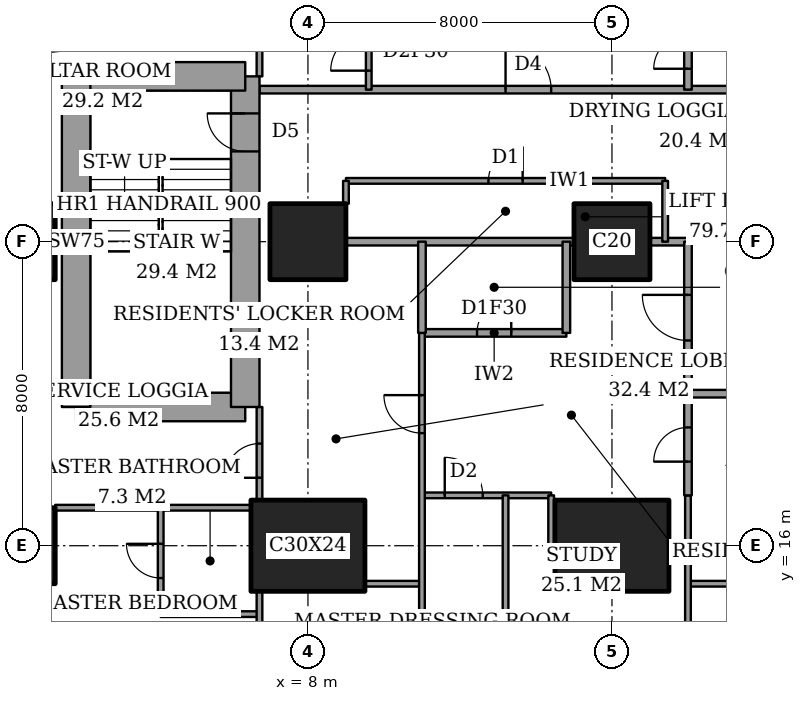
"""IFC4 building model, lengths in metres.
Left out: names, types, materials, properties, quantities, classifications, styles, units other than length and angle.
Written with IfcOpenShell. Run it as: python <this file> out.ifc"""

import sys

from ifc_helpers import new_model, si_unit, direction, frame, frame_2d, origin, origin_2d, place, context, subcontext, project, spatial, rectangle, extrude, element, fill, save


model = new_model("IFC4")
c1 = context("Model", 3, precision=1e-05, world=origin(), true_north=direction((0.0, 1.0)))
c2 = subcontext(c1, "Body", "Model", "MODEL_VIEW")
j1 = project(units=[si_unit("LENGTHUNIT", "METRE"), si_unit("PLANEANGLEUNIT", "RADIAN")], contexts=[c1])
p1 = place(None, origin())
s1 = spatial("IfcSite", under=j1, at=p1, CompositionType="ELEMENT")
p2 = place(p1, origin())
s2 = spatial("IfcBuilding", under=s1, at=p2, CompositionType="ELEMENT")
p3 = place(p2, frame((0.0, 0.0, 72.8)))
s3 = spatial("IfcBuildingStorey", under=s2, at=p3, CompositionType="ELEMENT", Elevation=72.8)
for number, where, z_axis, x_axis in (
    (1, (0.35, 16.0, 0.0), (0.0, 0.0, 1.0), (1.0, 0.0, 0.0)),
    (2, (0.35, 24.0, 0.0), (0.0, 0.0, 1.0), (1.0, 0.0, 0.0)),
):
    element("IfcColumn", number, at=place(p3, frame(where, z_axis=z_axis, x_axis=x_axis)), inside=s3, PredefinedType="COLUMN", context=c2, shape_type="SweptSolid", body=[
        extrude(rectangle(XDim=2.0, YDim=2.0, at=origin_2d()), origin(), (0.0, 0.0, 1.0), 3.6),
    ])
p4 = place(p3, frame((8.0, 16.0, 0.0), z_axis=(0.0, 0.0, 1.0), x_axis=(1.0, 0.0, 0.0)))
e3 = element("IfcColumn", 3, at=p4, inside=s3, PredefinedType="COLUMN", context=c2, shape_type="SweptSolid", body=[
    extrude(rectangle(XDim=3.0, YDim=2.4, at=origin_2d()), origin(), (0.0, 0.0, 1.0), 3.6),
])
p5 = place(p3, frame((8.0, 24.0, 0.0), z_axis=(0.0, 0.0, 1.0), x_axis=(1.0, 0.0, 0.0)))
e4 = element("IfcColumn", 4, at=p5, inside=s3, PredefinedType="COLUMN", context=c2, shape_type="SweptSolid", body=[
    extrude(rectangle(XDim=2.0, YDim=2.0, at=origin_2d()), origin(), (0.0, 0.0, 1.0), 3.6),
])
p6 = place(p3, frame((16.0, 16.0, 0.0), z_axis=(0.0, 0.0, 1.0), x_axis=(1.0, 0.0, 0.0)))
e5 = element("IfcColumn", 5, at=p6, inside=s3, PredefinedType="COLUMN", context=c2, shape_type="SweptSolid", body=[
    extrude(rectangle(XDim=3.0, YDim=2.4, at=origin_2d()), origin(), (0.0, 0.0, 1.0), 3.6),
])
p7 = place(p3, frame((16.0, 24.0, 0.0), z_axis=(0.0, 0.0, 1.0), x_axis=(1.0, 0.0, 0.0)))
e6 = element("IfcColumn", 6, at=p7, inside=s3, PredefinedType="COLUMN", context=c2, shape_type="SweptSolid", body=[
    extrude(rectangle(XDim=2.0, YDim=2.0, at=origin_2d()), origin(), (0.0, 0.0, 1.0), 3.6),
])
p8 = place(p3, frame((1.9, 19.65, 0.0), z_axis=(0.0, 0.0, 1.0), x_axis=(1.0, 0.0, 0.0)))
e7 = element("IfcWall", 7, at=p8, inside=s3, PredefinedType="SHEAR", context=c2, shape_type="SweptSolid", body=[
    extrude(rectangle(XDim=4.45, YDim=0.75, at=frame_2d((2.225, 0.0))), origin(), (0.0, 0.0, 1.0), 3.6),
])
p9 = place(p3, frame((6.35, 19.65, 0.0), z_axis=(0.0, 0.0, 1.0), x_axis=(0.0, 1.0, 0.0)))
e8 = element("IfcWall", 8, at=p9, inside=s3, PredefinedType="SHEAR", context=c2, shape_type="SweptSolid", body=[
    extrude(rectangle(XDim=8.7, YDim=0.75, at=frame_2d((4.35, 0.0))), origin(), (0.0, 0.0, 1.0), 3.6),
])
p10 = place(p9, frame((6.725, 0.0, 0.0)))
e9 = element("IfcOpeningElement", 9, at=p10, cuts=e8, PredefinedType="OPENING", context=c2, shape_type="SweptSolid", body=[
    extrude(rectangle(XDim=1.0, YDim=2.1, at=frame_2d((0.5, 1.05))), frame((0.0, 0.385, 0.0), z_axis=(0.0, -1.0, 0.0), x_axis=(1.0, 0.0, 0.0)), (0.0, 0.0, 1.0), 0.77),
])
p11 = place(p3, frame((6.35, 28.35, 0.0), z_axis=(0.0, 0.0, 1.0), x_axis=(-1.0, 0.0, 0.0)))
e10 = element("IfcWall", 10, at=p11, inside=s3, PredefinedType="SHEAR", context=c2, shape_type="SweptSolid", body=[
    extrude(rectangle(XDim=4.45, YDim=0.75, at=frame_2d((2.225, 0.0))), origin(), (0.0, 0.0, 1.0), 3.6),
])
p12 = place(p3, frame((1.9, 28.35, 0.0), z_axis=(0.0, 0.0, 1.0), x_axis=(0.0, -1.0, 0.0)))
e11 = element("IfcWall", 11, at=p12, inside=s3, PredefinedType="SHEAR", context=c2, shape_type="SweptSolid", body=[
    extrude(rectangle(XDim=8.7, YDim=0.75, at=frame_2d((4.35, 0.0))), origin(), (0.0, 0.0, 1.0), 3.6),
])
p13 = place(p3, frame((4.125, 14.2, 0.0), z_axis=(0.0, 0.0, 1.0), x_axis=(1.0, 0.0, 0.0)))
e12 = element("IfcWall", 12, at=p13, inside=s3, PredefinedType="PARTITIONING", context=c2, shape_type="SweptSolid", body=[
    extrude(rectangle(XDim=2.6, YDim=0.15, at=frame_2d((1.3, 0.0))), origin(), (0.0, 0.0, 1.0), 3.35),
])
p14 = place(p3, frame((9.5, 15.0, 0.0), z_axis=(0.0, 0.0, 1.0), x_axis=(1.0, 0.0, 0.0)))
e13 = element("IfcWall", 13, at=p14, inside=s3, PredefinedType="PARTITIONING", context=c2, shape_type="SweptSolid", body=[
    extrude(rectangle(XDim=1.5, YDim=0.15, at=frame_2d((0.75, 0.0))), origin(), (0.0, 0.0, 1.0), 3.35),
])
p15 = place(p3, frame((18.0, 15.0, 0.0), z_axis=(0.0, 0.0, 1.0), x_axis=(1.0, 0.0, 0.0)))
e14 = element("IfcWall", 14, at=p15, inside=s3, PredefinedType="PARTITIONING", context=c2, shape_type="SweptSolid", body=[
    extrude(rectangle(XDim=6.0, YDim=0.15, at=frame_2d((3.0, 0.0))), origin(), (0.0, 0.0, 1.0), 3.35),
])
p16 = place(p3, frame((17.5, 15.875, 0.0), z_axis=(0.0, 0.0, 1.0), x_axis=(1.0, 0.0, 0.0)))
e15 = element("IfcWall", 15, at=p16, inside=s3, PredefinedType="PARTITIONING", context=c2, shape_type="SweptSolid", body=[
    extrude(rectangle(XDim=0.5, YDim=0.15, at=frame_2d((0.25, 0.0))), origin(), (0.0, 0.0, 1.0), 2.634),
])
p17 = place(p3, frame((1.35, 17.0, 0.0), z_axis=(0.0, 0.0, 1.0), x_axis=(1.0, 0.0, 0.0)))
e16 = element("IfcWall", 16, at=p17, inside=s3, PredefinedType="PARTITIONING", context=c2, shape_type="SweptSolid", body=[
    extrude(rectangle(XDim=5.15, YDim=0.15, at=frame_2d((2.575, 0.0))), origin(), (0.0, 0.0, 1.0), 3.35),
])
p18 = place(p3, frame((11.0, 17.325, 0.0), z_axis=(0.0, 0.0, 1.0), x_axis=(1.0, 0.0, 0.0)))
e17 = element("IfcWall", 17, at=p18, inside=s3, PredefinedType="PARTITIONING", context=c2, shape_type="SweptSolid", body=[
    extrude(rectangle(XDim=3.4, YDim=0.15, at=frame_2d((1.7, 0.0))), origin(), (0.0, 0.0, 1.0), 3.35),
])
p19 = place(p18, frame((0.6, 0.0, 0.0)))
e18 = element("IfcOpeningElement", 18, at=p19, cuts=e17, PredefinedType="OPENING", context=c2, shape_type="SweptSolid", body=[
    extrude(rectangle(XDim=1.0, YDim=2.1, at=frame_2d((0.5, 1.05))), frame((0.0, 0.085, 0.0), z_axis=(0.0, -1.0, 0.0), x_axis=(1.0, 0.0, 0.0)), (0.0, 0.0, 1.0), 0.17),
])
p20 = place(p3, frame((18.0, 20.0, 0.0), z_axis=(0.0, 0.0, 1.0), x_axis=(1.0, 0.0, 0.0)))
e19 = element("IfcWall", 19, at=p20, inside=s3, PredefinedType="PARTITIONING", context=c2, shape_type="SweptSolid", body=[
    extrude(rectangle(XDim=6.0, YDim=0.2, at=frame_2d((3.0, 0.0))), origin(), (0.0, 0.0, 1.0), 3.35),
])
p21 = place(p3, frame((11.0, 21.6, 0.0), z_axis=(0.0, 0.0, 1.0), x_axis=(1.0, 0.0, 0.0)))
e20 = element("IfcWall", 20, at=p21, inside=s3, PredefinedType="PARTITIONING", context=c2, shape_type="SweptSolid", body=[
    extrude(rectangle(XDim=3.8, YDim=0.2, at=frame_2d((1.9, 0.0))), origin(), (0.0, 0.0, 1.0), 3.35),
])
p22 = place(p21, frame((1.45, 0.0, 0.0)))
e21 = element("IfcOpeningElement", 21, at=p22, cuts=e20, PredefinedType="OPENING", context=c2, shape_type="SweptSolid", body=[
    extrude(rectangle(XDim=0.9, YDim=2.1, at=frame_2d((0.45, 1.05))), frame((0.0, 0.11, 0.0), z_axis=(0.0, -1.0, 0.0), x_axis=(1.0, 0.0, 0.0)), (0.0, 0.0, 1.0), 0.22),
])
p23 = place(p3, frame((9.0, 24.0, 0.0), z_axis=(0.0, 0.0, 1.0), x_axis=(1.0, 0.0, 0.0)))
e22 = element("IfcWall", 22, at=p23, inside=s3, PredefinedType="PARTITIONING", context=c2, shape_type="SweptSolid", body=[
    extrude(rectangle(XDim=6.0, YDim=0.2, at=frame_2d((3.0, 0.0))), origin(), (0.0, 0.0, 1.0), 3.35),
])
p24 = place(p3, frame((17.0, 24.0, 0.0), z_axis=(0.0, 0.0, 1.0), x_axis=(1.0, 0.0, 0.0)))
e23 = element("IfcWall", 23, at=p24, inside=s3, PredefinedType="PARTITIONING", context=c2, shape_type="SweptSolid", body=[
    extrude(rectangle(XDim=1.0, YDim=0.2, at=frame_2d((0.5, 0.0))), origin(), (0.0, 0.0, 1.0), 3.35),
])
p25 = place(p3, frame((9.0, 25.6, 0.0), z_axis=(0.0, 0.0, 1.0), x_axis=(1.0, 0.0, 0.0)))
e24 = element("IfcWall", 24, at=p25, inside=s3, PredefinedType="PARTITIONING", context=c2, shape_type="SweptSolid", body=[
    extrude(rectangle(XDim=8.4, YDim=0.15, at=frame_2d((4.2, 0.0))), origin(), (0.0, 0.0, 1.0), 3.35),
])
p26 = place(p25, frame((3.75, 0.0, 0.0)))
e25 = element("IfcOpeningElement", 25, at=p26, cuts=e24, PredefinedType="OPENING", context=c2, shape_type="SweptSolid", body=[
    extrude(rectangle(XDim=0.9, YDim=2.1, at=frame_2d((0.45, 1.05))), frame((0.0, 0.085, 0.0), z_axis=(0.0, -1.0, 0.0), x_axis=(1.0, 0.0, 0.0)), (0.0, 0.0, 1.0), 0.17),
])
p27 = place(p3, frame((6.725, 28.0, 0.0), z_axis=(0.0, 0.0, 1.0), x_axis=(1.0, 0.0, 0.0)))
e26 = element("IfcWall", 26, at=p27, inside=s3, PredefinedType="PARTITIONING", context=c2, shape_type="SweptSolid", body=[
    extrude(rectangle(XDim=17.275, YDim=0.2, at=frame_2d((8.637, 0.0))), origin(), (0.0, 0.0, 1.0), 3.35),
])
p28 = place(p27, frame((6.475, 0.0, 0.0)))
e27 = element("IfcOpeningElement", 27, at=p28, cuts=e26, PredefinedType="OPENING", context=c2, shape_type="SweptSolid", body=[
    extrude(rectangle(XDim=1.2, YDim=2.4, at=frame_2d((0.6, 1.2))), frame((0.0, 0.11, 0.0), z_axis=(0.0, -1.0, 0.0), x_axis=(1.0, 0.0, 0.0)), (0.0, 0.0, 1.0), 0.22),
])
p29 = place(p3, frame((4.125, 14.2, 0.0), z_axis=(0.0, 0.0, 1.0), x_axis=(0.0, 1.0, 0.0)))
e28 = element("IfcWall", 28, at=p29, inside=s3, PredefinedType="PARTITIONING", context=c2, shape_type="SweptSolid", body=[
    extrude(rectangle(XDim=2.8, YDim=0.15, at=frame_2d((1.4, 0.0))), origin(), (0.0, 0.0, 1.0), 3.35),
])
p30 = place(p29, frame((0.95, 0.0, 0.0)))
e29 = element("IfcOpeningElement", 29, at=p30, cuts=e28, PredefinedType="OPENING", context=c2, shape_type="SweptSolid", body=[
    extrude(rectangle(XDim=0.9, YDim=2.1, at=frame_2d((0.45, 1.05))), frame((0.0, 0.085, 0.0), z_axis=(0.0, -1.0, 0.0), x_axis=(1.0, 0.0, 0.0)), (0.0, 0.0, 1.0), 0.17),
])
p31 = place(p3, frame((6.725, 11.0, 0.0), z_axis=(0.0, 0.0, 1.0), x_axis=(0.0, 1.0, 0.0)))
e30 = element("IfcWall", 30, at=p31, inside=s3, PredefinedType="PARTITIONING", context=c2, shape_type="SweptSolid", body=[
    extrude(rectangle(XDim=3.8, YDim=0.15, at=frame_2d((1.9, 0.0))), origin(), (0.0, 0.0, 1.0), 3.35),
])
p32 = place(p31, frame((1.15, 0.0, 0.0)))
e31 = element("IfcOpeningElement", 31, at=p32, cuts=e30, PredefinedType="OPENING", context=c2, shape_type="SweptSolid", body=[
    extrude(rectangle(XDim=0.9, YDim=2.1, at=frame_2d((0.45, 1.05))), frame((0.0, 0.085, 0.0), z_axis=(0.0, -1.0, 0.0), x_axis=(1.0, 0.0, 0.0)), (0.0, 0.0, 1.0), 0.17),
])
p33 = place(p3, frame((6.725, 17.2, 0.0), z_axis=(0.0, 0.0, 1.0), x_axis=(0.0, 1.0, 0.0)))
e32 = element("IfcWall", 32, at=p33, inside=s3, PredefinedType="PARTITIONING", context=c2, shape_type="SweptSolid", body=[
    extrude(rectangle(XDim=2.45, YDim=0.15, at=frame_2d((1.225, 0.0))), origin(), (0.0, 0.0, 1.0), 3.35),
])
p34 = place(p33, frame((0.587, 0.0, 0.0)))
e33 = element("IfcOpeningElement", 33, at=p34, cuts=e32, PredefinedType="OPENING", context=c2, shape_type="SweptSolid", body=[
    extrude(rectangle(XDim=0.9, YDim=2.1, at=frame_2d((0.45, 1.05))), frame((0.0, 0.085, 0.0), z_axis=(0.0, -1.0, 0.0), x_axis=(1.0, 0.0, 0.0)), (0.0, 0.0, 1.0), 0.17),
])
p35 = place(p3, frame((6.725, 28.35, 0.0), z_axis=(0.0, 0.0, 1.0), x_axis=(0.0, 1.0, 0.0)))
e34 = element("IfcWall", 34, at=p35, inside=s3, PredefinedType="PARTITIONING", context=c2, shape_type="SweptSolid", body=[
    extrude(rectangle(XDim=2.45, YDim=0.15, at=frame_2d((1.225, 0.0))), origin(), (0.0, 0.0, 1.0), 3.35),
])
p36 = place(p35, frame((0.913, 0.0, 0.0)))
e35 = element("IfcOpeningElement", 35, at=p36, cuts=e34, PredefinedType="OPENING", context=c2, shape_type="SweptSolid", body=[
    extrude(rectangle(XDim=1.0, YDim=2.1, at=frame_2d((0.5, 1.05))), frame((0.0, 0.085, 0.0), z_axis=(0.0, -1.0, 0.0), x_axis=(1.0, 0.0, 0.0)), (0.0, 0.0, 1.0), 0.17),
])
p37 = place(p3, frame((9.0, 25.0, 0.0), z_axis=(0.0, 0.0, 1.0), x_axis=(0.0, 1.0, 0.0)))
e36 = element("IfcWall", 36, at=p37, inside=s3, PredefinedType="PARTITIONING", context=c2, shape_type="SweptSolid", body=[
    extrude(rectangle(XDim=0.6, YDim=0.15, at=frame_2d((0.3, 0.0))), origin(), (0.0, 0.0, 1.0), 3.35),
])
p38 = place(p3, frame((9.6, 28.0, 0.0), z_axis=(0.0, 0.0, 1.0), x_axis=(0.0, 1.0, 0.0)))
e37 = element("IfcWall", 37, at=p38, inside=s3, PredefinedType="PARTITIONING", context=c2, shape_type="SweptSolid", body=[
    extrude(rectangle(XDim=9.4, YDim=0.15, at=frame_2d((4.7, 0.0))), origin(), (0.0, 0.0, 1.0), 3.35),
])
p39 = place(p38, frame((0.5, 0.0, 0.0)))
e38 = element("IfcOpeningElement", 38, at=p39, cuts=e37, PredefinedType="OPENING", context=c2, shape_type="SweptSolid", body=[
    extrude(rectangle(XDim=1.0, YDim=2.1, at=frame_2d((0.5, 1.05))), frame((0.0, 0.085, 0.0), z_axis=(0.0, -1.0, 0.0), x_axis=(1.0, 0.0, 0.0)), (0.0, 0.0, 1.0), 0.17),
])
p40 = place(p3, frame((11.0, 21.6, 0.0), z_axis=(0.0, 0.0, 1.0), x_axis=(0.0, 1.0, 0.0)))
e39 = element("IfcWall", 39, at=p40, inside=s3, PredefinedType="PARTITIONING", context=c2, shape_type="SweptSolid", body=[
    extrude(rectangle(XDim=2.4, YDim=0.2, at=frame_2d((1.2, 0.0))), origin(), (0.0, 0.0, 1.0), 3.35),
])
p41 = place(p3, frame((11.0, 11.0, 0.0), z_axis=(0.0, 0.0, 1.0), x_axis=(0.0, 1.0, 0.0)))
e40 = element("IfcWall", 40, at=p41, inside=s3, PredefinedType="PARTITIONING", context=c2, shape_type="SweptSolid", body=[
    extrude(rectangle(XDim=10.6, YDim=0.15, at=frame_2d((5.3, 0.0))), origin(), (0.0, 0.0, 1.0), 3.35),
])
p42 = place(p41, frame((7.962, 0.0, 0.0)))
e41 = element("IfcOpeningElement", 41, at=p42, cuts=e40, PredefinedType="OPENING", context=c2, shape_type="SweptSolid", body=[
    extrude(rectangle(XDim=1.0, YDim=2.1, at=frame_2d((0.5, 1.05))), frame((0.0, 0.085, 0.0), z_axis=(0.0, -1.0, 0.0), x_axis=(1.0, 0.0, 0.0)), (0.0, 0.0, 1.0), 0.17),
])
p43 = place(p3, frame((13.2, 11.0, 0.0), z_axis=(0.0, 0.0, 1.0), x_axis=(0.0, 1.0, 0.0)))
e42 = element("IfcWall", 42, at=p43, inside=s3, PredefinedType="PARTITIONING", context=c2, shape_type="SweptSolid", body=[
    extrude(rectangle(XDim=6.325, YDim=0.15, at=frame_2d((3.163, 0.0))), origin(), (0.0, 0.0, 1.0), 3.35),
])
p44 = place(p3, frame((14.4, 15.875, 0.0), z_axis=(0.0, 0.0, 1.0), x_axis=(0.0, 1.0, 0.0)))
e43 = element("IfcWall", 43, at=p44, inside=s3, PredefinedType="PARTITIONING", context=c2, shape_type="SweptSolid", body=[
    extrude(rectangle(XDim=1.45, YDim=0.15, at=frame_2d((0.725, 0.0))), origin(), (0.0, 0.0, 1.0), 3.35),
])
p45 = place(p3, frame((14.8, 21.6, 0.0), z_axis=(0.0, 0.0, 1.0), x_axis=(0.0, 1.0, 0.0)))
e44 = element("IfcWall", 44, at=p45, inside=s3, PredefinedType="PARTITIONING", context=c2, shape_type="SweptSolid", body=[
    extrude(rectangle(XDim=2.4, YDim=0.2, at=frame_2d((1.2, 0.0))), origin(), (0.0, 0.0, 1.0), 3.35),
])
p46 = place(p3, frame((17.4, 24.0, 0.0), z_axis=(0.0, 0.0, 1.0), x_axis=(0.0, 1.0, 0.0)))
e45 = element("IfcWall", 45, at=p46, inside=s3, PredefinedType="PARTITIONING", context=c2, shape_type="SweptSolid", body=[
    extrude(rectangle(XDim=1.6, YDim=0.15, at=frame_2d((0.8, 0.0))), origin(), (0.0, 0.0, 1.0), 3.35),
])
p47 = place(p3, frame((18.0, 17.325, 0.0), z_axis=(0.0, 0.0, 1.0), x_axis=(0.0, 1.0, 0.0)))
e46 = element("IfcWall", 46, at=p47, inside=s3, PredefinedType="PARTITIONING", context=c2, shape_type="SweptSolid", body=[
    extrude(rectangle(XDim=6.675, YDim=0.2, at=frame_2d((3.337, 0.0))), origin(), (0.0, 0.0, 1.0), 3.35),
])
p48 = place(p47, frame((4.075, 0.0, 0.0)))
e47 = element("IfcOpeningElement", 47, at=p48, cuts=e46, PredefinedType="OPENING", context=c2, shape_type="SweptSolid", body=[
    extrude(rectangle(XDim=1.2, YDim=2.4, at=frame_2d((0.6, 1.2))), frame((0.0, 0.11, 0.0), z_axis=(0.0, -1.0, 0.0), x_axis=(1.0, 0.0, 0.0)), (0.0, 0.0, 1.0), 0.22),
])
p49 = place(p47, frame((0.887, 0.0, 0.0)))
e48 = element("IfcOpeningElement", 48, at=p49, cuts=e46, PredefinedType="OPENING", context=c2, shape_type="SweptSolid", body=[
    extrude(rectangle(XDim=0.9, YDim=2.1, at=frame_2d((0.45, 1.05))), frame((0.0, 0.11, 0.0), z_axis=(0.0, -1.0, 0.0), x_axis=(1.0, 0.0, 0.0)), (0.0, 0.0, 1.0), 0.22),
])
p50 = place(p3, frame((18.0, 28.0, 0.0), z_axis=(0.0, 0.0, 1.0), x_axis=(0.0, 1.0, 0.0)))
e49 = element("IfcWall", 49, at=p50, inside=s3, PredefinedType="PARTITIONING", context=c2, shape_type="SweptSolid", body=[
    extrude(rectangle(XDim=3.4, YDim=0.2, at=frame_2d((1.7, 0.0))), origin(), (0.0, 0.0, 1.0), 3.35),
])
p51 = place(p50, frame((0.55, 0.0, 0.0)))
e50 = element("IfcOpeningElement", 50, at=p51, cuts=e49, PredefinedType="OPENING", context=c2, shape_type="SweptSolid", body=[
    extrude(rectangle(XDim=0.9, YDim=2.1, at=frame_2d((0.45, 1.05))), frame((0.0, 0.11, 0.0), z_axis=(0.0, -1.0, 0.0), x_axis=(1.0, 0.0, 0.0)), (0.0, 0.0, 1.0), 0.22),
])
p52 = place(p3, frame((18.0, 11.0, 0.0), z_axis=(0.0, 0.0, 1.0), x_axis=(0.0, 1.0, 0.0)))
e51 = element("IfcWall", 51, at=p52, inside=s3, PredefinedType="PARTITIONING", context=c2, shape_type="SweptSolid", body=[
    extrude(rectangle(XDim=6.325, YDim=0.15, at=frame_2d((3.163, 0.0))), origin(), (0.0, 0.0, 1.0), 3.35),
])
p53 = place(p30, origin())
e52 = element("IfcDoor", 52, at=p53, inside=s3, OperationType="SINGLE_SWING_LEFT", PredefinedType="DOOR", context=c2, shape_type="SweptSolid", body=[
    extrude(rectangle(XDim=0.9, YDim=2.1, at=frame_2d((0.45, 1.05))), frame((0.0, 0.025, 0.0), z_axis=(0.0, -1.0, 0.0), x_axis=(1.0, 0.0, 0.0)), (0.0, 0.0, 1.0), 0.05),
])
fill(e29, e52)
p54 = place(p34, origin())
e53 = element("IfcDoor", 53, at=p54, inside=s3, OperationType="SINGLE_SWING_RIGHT", PredefinedType="DOOR", context=c2, shape_type="SweptSolid", body=[
    extrude(rectangle(XDim=0.9, YDim=2.1, at=frame_2d((0.45, 1.05))), frame((0.0, 0.025, 0.0), z_axis=(0.0, -1.0, 0.0), x_axis=(1.0, 0.0, 0.0)), (0.0, 0.0, 1.0), 0.05),
])
fill(e33, e53)
p55 = place(p42, origin())
e54 = element("IfcDoor", 54, at=p55, inside=s3, OperationType="SINGLE_SWING_LEFT", PredefinedType="DOOR", context=c2, shape_type="SweptSolid", body=[
    extrude(rectangle(XDim=1.0, YDim=2.1, at=frame_2d((0.5, 1.05))), frame((0.0, 0.025, 0.0), z_axis=(0.0, -1.0, 0.0), x_axis=(1.0, 0.0, 0.0)), (0.0, 0.0, 1.0), 0.05),
])
fill(e41, e54)
p56 = place(p22, origin())
e55 = element("IfcDoor", 55, at=p56, inside=s3, OperationType="SINGLE_SWING_LEFT", PredefinedType="DOOR", context=c2, shape_type="SweptSolid", body=[
    extrude(rectangle(XDim=0.9, YDim=2.1, at=frame_2d((0.45, 1.05))), frame((0.0, 0.025, 0.0), z_axis=(0.0, -1.0, 0.0), x_axis=(1.0, 0.0, 0.0)), (0.0, 0.0, 1.0), 0.05),
])
fill(e21, e55)
p57 = place(p48, origin())
e56 = element("IfcDoor", 56, at=p57, inside=s3, OperationType="SINGLE_SWING_LEFT", PredefinedType="DOOR", context=c2, shape_type="SweptSolid", body=[
    extrude(rectangle(XDim=1.2, YDim=2.4, at=frame_2d((0.6, 1.2))), frame((0.0, 0.025, 0.0), z_axis=(0.0, -1.0, 0.0), x_axis=(1.0, 0.0, 0.0)), (0.0, 0.0, 1.0), 0.05),
])
fill(e47, e56)
p58 = place(p19, origin())
e57 = element("IfcDoor", 57, at=p58, inside=s3, OperationType="SINGLE_SWING_RIGHT", PredefinedType="DOOR", context=c2, shape_type="SweptSolid", body=[
    extrude(rectangle(XDim=1.0, YDim=2.1, at=frame_2d((0.5, 1.05))), frame((0.0, 0.025, 0.0), z_axis=(0.0, -1.0, 0.0), x_axis=(1.0, 0.0, 0.0)), (0.0, 0.0, 1.0), 0.05),
])
fill(e18, e57)
p59 = place(p49, origin())
e58 = element("IfcDoor", 58, at=p59, inside=s3, OperationType="SINGLE_SWING_RIGHT", PredefinedType="DOOR", context=c2, shape_type="SweptSolid", body=[
    extrude(rectangle(XDim=0.9, YDim=2.1, at=frame_2d((0.45, 1.05))), frame((0.0, 0.025, 0.0), z_axis=(0.0, -1.0, 0.0), x_axis=(1.0, 0.0, 0.0)), (0.0, 0.0, 1.0), 0.05),
])
fill(e48, e58)
p60 = place(p39, origin())
e59 = element("IfcDoor", 59, at=p60, inside=s3, OperationType="SINGLE_SWING_RIGHT", PredefinedType="DOOR", context=c2, shape_type="SweptSolid", body=[
    extrude(rectangle(XDim=1.0, YDim=2.1, at=frame_2d((0.5, 1.05))), frame((0.0, 0.025, 0.0), z_axis=(0.0, -1.0, 0.0), x_axis=(1.0, 0.0, 0.0)), (0.0, 0.0, 1.0), 0.05),
])
fill(e38, e59)
p61 = place(p28, origin())
e60 = element("IfcDoor", 60, at=p61, inside=s3, OperationType="SINGLE_SWING_RIGHT", PredefinedType="DOOR", context=c2, shape_type="SweptSolid", body=[
    extrude(rectangle(XDim=1.2, YDim=2.4, at=frame_2d((0.6, 1.2))), frame((0.0, 0.025, 0.0), z_axis=(0.0, -1.0, 0.0), x_axis=(1.0, 0.0, 0.0)), (0.0, 0.0, 1.0), 0.05),
])
fill(e27, e60)
p62 = place(p51, origin())
e61 = element("IfcDoor", 61, at=p62, inside=s3, OperationType="SINGLE_SWING_RIGHT", PredefinedType="DOOR", context=c2, shape_type="SweptSolid", body=[
    extrude(rectangle(XDim=0.9, YDim=2.1, at=frame_2d((0.45, 1.05))), frame((0.0, 0.025, 0.0), z_axis=(0.0, -1.0, 0.0), x_axis=(1.0, 0.0, 0.0)), (0.0, 0.0, 1.0), 0.05),
])
fill(e50, e61)
p63 = place(p26, origin())
e62 = element("IfcDoor", 62, at=p63, inside=s3, OperationType="SINGLE_SWING_LEFT", PredefinedType="DOOR", context=c2, shape_type="SweptSolid", body=[
    extrude(rectangle(XDim=0.9, YDim=2.1, at=frame_2d((0.45, 1.05))), frame((0.0, 0.025, 0.0), z_axis=(0.0, -1.0, 0.0), x_axis=(1.0, 0.0, 0.0)), (0.0, 0.0, 1.0), 0.05),
])
fill(e25, e62)
p64 = place(p10, origin())
e63 = element("IfcDoor", 63, at=p64, inside=s3, OperationType="SINGLE_SWING_LEFT", PredefinedType="DOOR", context=c2, shape_type="SweptSolid", body=[
    extrude(rectangle(XDim=1.0, YDim=2.1, at=frame_2d((0.5, 1.05))), frame((0.0, 0.025, 0.0), z_axis=(0.0, -1.0, 0.0), x_axis=(1.0, 0.0, 0.0)), (0.0, 0.0, 1.0), 0.05),
])
fill(e9, e63)
save(model, sys.argv[1])
